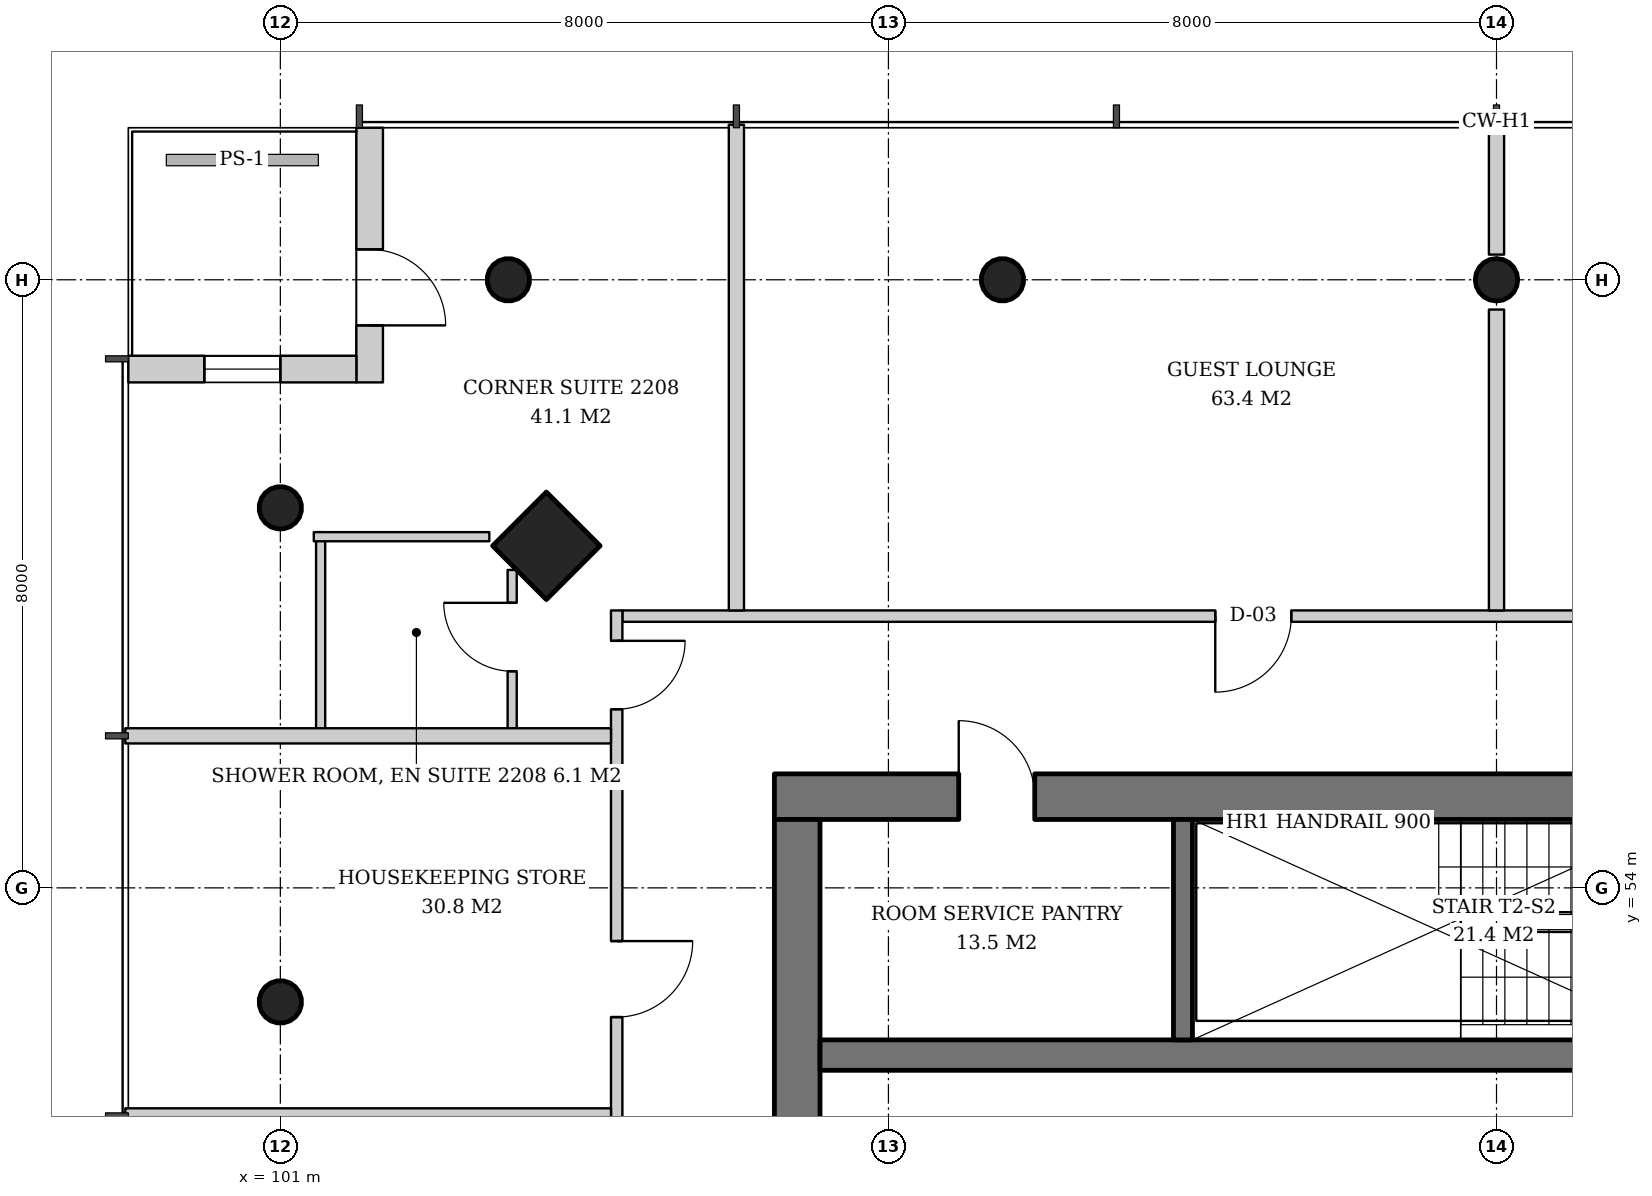
"""IFC4 building model, lengths in metres.
Left out: names, types, materials, properties, quantities, classifications, styles, units other than length and angle.
Written with IfcOpenShell. Run it as: python <this file> out.ifc"""

import sys

from ifc_helpers import new_model, si_unit, direction, frame, frame_2d, origin, origin_2d, place, context, subcontext, project, spatial, rectangle, hollow_circle, extrude, element, fill, save


model = new_model("IFC4")
c1 = context("Model", 3, precision=1e-05, world=origin(), true_north=direction((0.0, 1.0)))
c2 = subcontext(c1, "Body", "Model", "MODEL_VIEW")
j1 = project(units=[si_unit("LENGTHUNIT", "METRE"), si_unit("PLANEANGLEUNIT", "RADIAN")], contexts=[c1])
p1 = place(None, origin())
s1 = spatial("IfcSite", under=j1, at=p1, CompositionType="ELEMENT")
p2 = place(p1, origin())
s2 = spatial("IfcBuilding", under=s1, at=p2, CompositionType="ELEMENT")
p3 = place(p2, frame((0.0, 0.0, 89.4)))
s3 = spatial("IfcBuildingStorey", under=s2, at=p3, CompositionType="ELEMENT", Elevation=89.4)
p4 = place(p3, frame((104.448, 58.552, 0.0), z_axis=(0.043029647111, -0.043029647111, 0.998146732169), x_axis=(0.707106781187, 0.707106781187, 0.0)))
e1 = element("IfcColumn", 1, at=p4, inside=s3, PredefinedType="COLUMN", context=c2, shape_type="SweptSolid", body=[
    extrude(rectangle(XDim=1.0, YDim=1.0, at=origin_2d()), origin(), (0.0, 0.0, 1.0), 3.807),
])
p5 = place(p3, frame((103.948, 62.052, 0.0), z_axis=(0.043029647111, -0.043029647111, 0.998146732169), x_axis=(0.707106781187, 0.707106781187, 0.0)))
e2 = element("IfcColumn", 2, at=p5, inside=s3, PredefinedType="COLUMN", context=c2, shape_type="SweptSolid", body=[
    extrude(hollow_circle(Radius=0.28, WallThickness=0.02, at=origin_2d()), origin(), (0.0, 0.0, 1.0), 3.807),
])
p6 = place(p3, frame((117.0, 62.052, 0.0), z_axis=(0.0, -0.043069538298, 0.999072076915), x_axis=(1.0, 0.0, 0.0)))
e3 = element("IfcColumn", 3, at=p6, inside=s3, PredefinedType="COLUMN", context=c2, shape_type="SweptSolid", body=[
    extrude(hollow_circle(Radius=0.28, WallThickness=0.02, at=origin_2d()), origin(), (0.0, 0.0, 1.0), 3.803),
])
p7 = place(p3, frame((110.474, 62.052, 0.0), z_axis=(0.021561848751, -0.043059525333, 0.998839808957), x_axis=(0.894160516368, 0.44774654769, 0.0)))
e4 = element("IfcColumn", 4, at=p7, inside=s3, PredefinedType="COLUMN", context=c2, shape_type="SweptSolid", body=[
    extrude(hollow_circle(Radius=0.28, WallThickness=0.02, at=origin_2d()), origin(), (0.0, 0.0, 1.0), 3.804),
])
p8 = place(p3, frame((100.948, 59.052, 0.0), z_axis=(0.043029647111, -0.043029647111, 0.998146732169), x_axis=(0.707106781187, 0.707106781187, 0.0)))
e5 = element("IfcColumn", 5, at=p8, inside=s3, PredefinedType="COLUMN", context=c2, shape_type="SweptSolid", body=[
    extrude(hollow_circle(Radius=0.28, WallThickness=0.02, at=origin_2d()), origin(), (0.0, 0.0, 1.0), 3.807),
])
p9 = place(p3, frame((100.948, 52.526, 0.0), z_axis=(0.043059525333, -0.021561848751, 0.998839808957), x_axis=(0.44774654769, 0.894160516368, 0.0)))
e6 = element("IfcColumn", 6, at=p9, inside=s3, PredefinedType="COLUMN", context=c2, shape_type="SweptSolid", body=[
    extrude(hollow_circle(Radius=0.28, WallThickness=0.02, at=origin_2d()), origin(), (0.0, 0.0, 1.0), 3.804),
])
p10 = place(p3, frame((107.5, 55.2, 0.0), z_axis=(0.0, 0.0, 1.0), x_axis=(1.0, 0.0, 0.0)))
e7 = element("IfcWall", 7, at=p10, inside=s3, PredefinedType="SHEAR", context=c2, shape_type="SweptSolid", body=[
    extrude(rectangle(XDim=19.0, YDim=0.6, at=frame_2d((9.5, 0.0))), origin(), (0.0, 0.0, 1.0), 3.8),
])
p11 = place(p10, frame((14.14, 0.0, 0.0)))
e8 = element("IfcOpeningElement", 8, at=p11, cuts=e7, PredefinedType="OPENING", context=c2, shape_type="SweptSolid", body=[
    extrude(rectangle(XDim=1.0, YDim=2.1, at=frame_2d((0.5, 1.05))), frame((0.0, 0.31, 0.0), z_axis=(0.0, -1.0, 0.0), x_axis=(1.0, 0.0, 0.0)), (0.0, 0.0, 1.0), 0.62),
])
p12 = place(p10, frame((2.425, 0.0, 0.0)))
e9 = element("IfcOpeningElement", 9, at=p12, cuts=e7, PredefinedType="OPENING", context=c2, shape_type="SweptSolid", body=[
    extrude(rectangle(XDim=1.0, YDim=2.1, at=frame_2d((0.5, 1.05))), frame((0.0, 0.31, 0.0), z_axis=(0.0, -1.0, 0.0), x_axis=(1.0, 0.0, 0.0)), (0.0, 0.0, 1.0), 0.62),
])
p13 = place(p3, frame((107.8, 37.1, 0.0), z_axis=(0.0, 0.0, 1.0), x_axis=(0.0, 1.0, 0.0)))
e10 = element("IfcWall", 10, at=p13, inside=s3, PredefinedType="SHEAR", context=c2, shape_type="SweptSolid", body=[
    extrude(rectangle(XDim=17.8, YDim=0.6, at=frame_2d((8.9, 0.0))), origin(), (0.0, 0.0, 1.0), 3.8),
])
p14 = place(p13, frame((8.0, 0.0, 0.0)))
e11 = element("IfcOpeningElement", 11, at=p14, cuts=e10, PredefinedType="OPENING", context=c2, shape_type="SweptSolid", body=[
    extrude(rectangle(XDim=1.8, YDim=2.4, at=frame_2d((0.9, 1.2))), frame((0.0, 0.31, 0.0), z_axis=(0.0, -1.0, 0.0), x_axis=(1.0, 0.0, 0.0)), (0.0, 0.0, 1.0), 0.62),
])
p15 = place(p3, frame((108.1, 51.8, 0.0), z_axis=(0.0, 0.0, 1.0), x_axis=(1.0, 0.0, 0.0)))
e12 = element("IfcWall", 12, at=p15, inside=s3, PredefinedType="SHEAR", context=c2, shape_type="SweptSolid", body=[
    extrude(rectangle(XDim=17.8, YDim=0.4, at=frame_2d((8.9, 0.0))), origin(), (0.0, 0.0, 1.0), 3.8),
])
p16 = place(p3, frame((102.175, 64.0, 0.0), z_axis=(0.0, 0.0, 1.0), x_axis=(0.0, -1.0, 0.0)))
e13 = element("IfcWall", 13, at=p16, inside=s3, PredefinedType="SOLIDWALL", context=c2, shape_type="SweptSolid", body=[
    extrude(rectangle(XDim=3.35, YDim=0.35, at=frame_2d((1.675, 0.0))), origin(), (0.0, 0.0, 1.0), 3.6),
])
p17 = place(p16, frame((1.6, 0.0, 0.0)))
e14 = element("IfcOpeningElement", 14, at=p17, cuts=e13, PredefinedType="OPENING", context=c2, shape_type="SweptSolid", body=[
    extrude(rectangle(XDim=1.0, YDim=2.4, at=frame_2d((0.5, 1.2))), frame((0.0, 0.185, 0.0), z_axis=(0.0, -1.0, 0.0), x_axis=(1.0, 0.0, 0.0)), (0.0, 0.0, 1.0), 0.37),
])
p18 = place(p3, frame((102.0, 60.825, 0.0), z_axis=(0.0, 0.0, 1.0), x_axis=(-1.0, 0.0, 0.0)))
e15 = element("IfcWall", 15, at=p18, inside=s3, PredefinedType="SOLIDWALL", context=c2, shape_type="SweptSolid", body=[
    extrude(rectangle(XDim=3.0, YDim=0.35, at=frame_2d((1.5, 0.0))), origin(), (0.0, 0.0, 1.0), 3.6),
])
p19 = place(p18, frame((1.0, 0.0, 0.9)))
e16 = element("IfcOpeningElement", 16, at=p19, cuts=e15, PredefinedType="OPENING", context=c2, shape_type="SweptSolid", body=[
    extrude(rectangle(XDim=1.0, YDim=2.4, at=frame_2d((0.5, 1.2))), frame((0.0, 0.185, 0.0), z_axis=(0.0, -1.0, 0.0), x_axis=(1.0, 0.0, 0.0)), (0.0, 0.0, 1.0), 0.37),
])
p20 = place(p3, frame((112.875, 52.0, 0.0), z_axis=(0.0, 0.0, 1.0), x_axis=(0.0, 1.0, 0.0)))
e17 = element("IfcWall", 17, at=p20, inside=s3, PredefinedType="SHEAR", context=c2, shape_type="SweptSolid", body=[
    extrude(rectangle(XDim=2.9, YDim=0.25, at=frame_2d((1.45, 0.0))), origin(), (0.0, 0.0, 1.0), 3.8),
])
p21 = place(p3, frame((128.65, 57.575, 0.0), z_axis=(0.0, 0.0, 1.0), x_axis=(-1.0, 0.0, 0.0)))
e18 = element("IfcWall", 18, at=p21, inside=s3, PredefinedType="PARTITIONING", context=c2, shape_type="SweptSolid", body=[
    extrude(rectangle(XDim=23.15, YDim=0.15, at=frame_2d((11.575, 0.0))), origin(), (0.0, 0.0, 1.0), 2.9),
])
p22 = place(p21, frame((0.4, 0.0, 0.0)))
e19 = element("IfcOpeningElement", 19, at=p22, cuts=e18, PredefinedType="OPENING", context=c2, shape_type="SweptSolid", body=[
    extrude(rectangle(XDim=0.9, YDim=2.1, at=frame_2d((0.45, 1.05))), frame((0.0, 0.085, 0.0), z_axis=(0.0, -1.0, 0.0), x_axis=(1.0, 0.0, 0.0)), (0.0, 0.0, 1.0), 0.17),
])
p23 = place(p21, frame((3.0, 0.0, 0.0)))
e20 = element("IfcOpeningElement", 20, at=p23, cuts=e18, PredefinedType="OPENING", context=c2, shape_type="SweptSolid", body=[
    extrude(rectangle(XDim=0.9, YDim=2.1, at=frame_2d((0.45, 1.05))), frame((0.0, 0.085, 0.0), z_axis=(0.0, -1.0, 0.0), x_axis=(1.0, 0.0, 0.0)), (0.0, 0.0, 1.0), 0.17),
])
p24 = place(p21, frame((9.4, 0.0, 0.0)))
e21 = element("IfcOpeningElement", 21, at=p24, cuts=e18, PredefinedType="OPENING", context=c2, shape_type="SweptSolid", body=[
    extrude(rectangle(XDim=0.9, YDim=2.1, at=frame_2d((0.45, 1.05))), frame((0.0, 0.085, 0.0), z_axis=(0.0, -1.0, 0.0), x_axis=(1.0, 0.0, 0.0)), (0.0, 0.0, 1.0), 0.17),
])
p25 = place(p21, frame((14.35, 0.0, 0.0)))
e22 = element("IfcOpeningElement", 22, at=p25, cuts=e18, PredefinedType="OPENING", context=c2, shape_type="SweptSolid", body=[
    extrude(rectangle(XDim=1.0, YDim=2.1, at=frame_2d((0.5, 1.05))), frame((0.0, 0.085, 0.0), z_axis=(0.0, -1.0, 0.0), x_axis=(1.0, 0.0, 0.0)), (0.0, 0.0, 1.0), 0.17),
])
p26 = place(p3, frame((117.0, 57.65, 0.0), z_axis=(0.0, 0.0, 1.0), x_axis=(0.0, 1.0, 0.0)))
e23 = element("IfcWall", 23, at=p26, inside=s3, PredefinedType="PARTITIONING", context=c2, shape_type="SweptSolid", body=[
    extrude(rectangle(XDim=3.958, YDim=0.2, at=frame_2d((1.979, 0.0))), origin(), (0.0, 0.0, 1.0), 3.6),
])
p27 = place(p3, frame((117.0, 62.331, 0.0), z_axis=(0.0, 0.0, 1.0), x_axis=(0.0, 1.0, 0.0)))
e24 = element("IfcWall", 24, at=p27, inside=s3, PredefinedType="PARTITIONING", context=c2, shape_type="SweptSolid", body=[
    extrude(rectangle(XDim=1.709, YDim=0.2, at=frame_2d((0.854, 0.0))), origin(), (0.0, 0.0, 1.0), 3.6),
])
p28 = place(p3, frame((107.0, 57.65, 0.0), z_axis=(0.0, 0.0, 1.0), x_axis=(0.0, 1.0, 0.0)))
e25 = element("IfcWall", 25, at=p28, inside=s3, PredefinedType="PARTITIONING", context=c2, shape_type="SweptSolid", body=[
    extrude(rectangle(XDim=6.39, YDim=0.2, at=frame_2d((3.195, 0.0))), origin(), (0.0, 0.0, 1.0), 3.2),
])
p29 = place(p3, frame((104.05, 56.1, 0.0), z_axis=(0.0, 0.0, 1.0), x_axis=(0.0, 1.0, 0.0)))
e26 = element("IfcWall", 26, at=p29, inside=s3, PredefinedType="PARTITIONING", context=c2, shape_type="SweptSolid", body=[
    extrude(rectangle(XDim=2.083, YDim=0.12, at=frame_2d((1.042, 0.0))), origin(), (0.0, 0.0, 1.0), 3.6),
])
p30 = place(p29, frame((0.75, 0.0, 0.0)))
e27 = element("IfcOpeningElement", 27, at=p30, cuts=e26, PredefinedType="OPENING", context=c2, shape_type="SweptSolid", body=[
    extrude(rectangle(XDim=0.9, YDim=2.1, at=frame_2d((0.45, 1.05))), frame((0.0, 0.07, 0.0), z_axis=(0.0, -1.0, 0.0), x_axis=(1.0, 0.0, 0.0)), (0.0, 0.0, 1.0), 0.14),
])
p31 = place(p3, frame((101.53, 56.1, 0.0), z_axis=(0.0, 0.0, 1.0), x_axis=(0.0, 1.0, 0.0)))
e28 = element("IfcWall", 28, at=p31, inside=s3, PredefinedType="PARTITIONING", context=c2, shape_type="SweptSolid", body=[
    extrude(rectangle(XDim=2.58, YDim=0.12, at=frame_2d((1.29, 0.0))), origin(), (0.0, 0.0, 1.0), 3.2),
])
p32 = place(p3, frame((103.75, 58.62, 0.0), z_axis=(0.0, 0.0, 1.0), x_axis=(-1.0, 0.0, 0.0)))
e29 = element("IfcWall", 29, at=p32, inside=s3, PredefinedType="PARTITIONING", context=c2, shape_type="SweptSolid", body=[
    extrude(rectangle(XDim=2.31, YDim=0.12, at=frame_2d((1.155, 0.0))), origin(), (0.0, 0.0, 1.0), 3.2),
])
p33 = place(p3, frame((105.425, 57.65, 0.0), z_axis=(0.0, 0.0, 1.0), x_axis=(0.0, -1.0, 0.0)))
e30 = element("IfcWall", 30, at=p33, inside=s3, PredefinedType="PARTITIONING", context=c2, shape_type="SweptSolid", body=[
    extrude(rectangle(XDim=23.15, YDim=0.15, at=frame_2d((11.575, 0.0))), origin(), (0.0, 0.0, 1.0), 2.9),
])
p34 = place(p33, frame((0.4, 0.0, 0.0)))
e31 = element("IfcOpeningElement", 31, at=p34, cuts=e30, PredefinedType="OPENING", context=c2, shape_type="SweptSolid", body=[
    extrude(rectangle(XDim=0.9, YDim=2.1, at=frame_2d((0.45, 1.05))), frame((0.0, 0.085, 0.0), z_axis=(0.0, -1.0, 0.0), x_axis=(1.0, 0.0, 0.0)), (0.0, 0.0, 1.0), 0.17),
])
p35 = place(p33, frame((4.35, 0.0, 0.0)))
e32 = element("IfcOpeningElement", 32, at=p35, cuts=e30, PredefinedType="OPENING", context=c2, shape_type="SweptSolid", body=[
    extrude(rectangle(XDim=1.0, YDim=2.1, at=frame_2d((0.5, 1.05))), frame((0.0, 0.085, 0.0), z_axis=(0.0, -1.0, 0.0), x_axis=(1.0, 0.0, 0.0)), (0.0, 0.0, 1.0), 0.17),
])
p36 = place(p33, frame((8.0, 0.0, 0.0)))
e33 = element("IfcOpeningElement", 33, at=p36, cuts=e30, PredefinedType="OPENING", context=c2, shape_type="SweptSolid", body=[
    extrude(rectangle(XDim=0.9, YDim=2.1, at=frame_2d((0.45, 1.05))), frame((0.0, 0.085, 0.0), z_axis=(0.0, -1.0, 0.0), x_axis=(1.0, 0.0, 0.0)), (0.0, 0.0, 1.0), 0.17),
])
p37 = place(p33, frame((14.4, 0.0, 0.0)))
e34 = element("IfcOpeningElement", 34, at=p37, cuts=e30, PredefinedType="OPENING", context=c2, shape_type="SweptSolid", body=[
    extrude(rectangle(XDim=0.9, YDim=2.1, at=frame_2d((0.45, 1.05))), frame((0.0, 0.085, 0.0), z_axis=(0.0, -1.0, 0.0), x_axis=(1.0, 0.0, 0.0)), (0.0, 0.0, 1.0), 0.17),
])
p38 = place(p33, frame((18.0, 0.0, 0.0)))
e35 = element("IfcOpeningElement", 35, at=p38, cuts=e30, PredefinedType="OPENING", context=c2, shape_type="SweptSolid", body=[
    extrude(rectangle(XDim=0.9, YDim=2.1, at=frame_2d((0.45, 1.05))), frame((0.0, 0.085, 0.0), z_axis=(0.0, -1.0, 0.0), x_axis=(1.0, 0.0, 0.0)), (0.0, 0.0, 1.0), 0.17),
])
p39 = place(p3, frame((105.35, 56.0, 0.0), z_axis=(0.0, 0.0, 1.0), x_axis=(-1.0, 0.0, 0.0)))
e36 = element("IfcWall", 36, at=p39, inside=s3, PredefinedType="PARTITIONING", context=c2, shape_type="SweptSolid", body=[
    extrude(rectangle(XDim=6.39, YDim=0.2, at=frame_2d((3.195, 0.0))), origin(), (0.0, 0.0, 1.0), 3.2),
])
p40 = place(p3, frame((105.35, 51.0, 0.0), z_axis=(0.0, 0.0, 1.0), x_axis=(-1.0, 0.0, 0.0)))
e37 = element("IfcWall", 37, at=p40, inside=s3, PredefinedType="PARTITIONING", context=c2, shape_type="SweptSolid", body=[
    extrude(rectangle(XDim=6.39, YDim=0.2, at=frame_2d((3.195, 0.0))), origin(), (0.0, 0.0, 1.0), 3.0),
])
p41 = place(p17, origin())
e38 = element("IfcDoor", 38, at=p41, inside=s3, OperationType="SINGLE_SWING_RIGHT", PredefinedType="DOOR", context=c2, shape_type="SweptSolid", body=[
    extrude(rectangle(XDim=1.0, YDim=2.4, at=frame_2d((0.5, 1.2))), frame((0.0, 0.025, 0.0), z_axis=(0.0, -1.0, 0.0), x_axis=(1.0, 0.0, 0.0)), (0.0, 0.0, 1.0), 0.05),
])
fill(e14, e38)
p42 = place(p19, origin())
e39 = element("IfcWindow", 39, at=p42, inside=s3, PartitioningType="SINGLE_PANEL", PredefinedType="WINDOW", context=c2, shape_type="SweptSolid", body=[
    extrude(rectangle(XDim=1.0, YDim=2.4, at=frame_2d((0.5, 1.2))), frame((0.0, 0.03, 0.0), z_axis=(0.0, -1.0, 0.0), x_axis=(1.0, 0.0, 0.0)), (0.0, 0.0, 1.0), 0.06),
])
fill(e16, e39)
p43 = place(p12, origin())
e40 = element("IfcDoor", 40, at=p43, inside=s3, OperationType="SINGLE_SWING_LEFT", PredefinedType="DOOR", context=c2, shape_type="SweptSolid", body=[
    extrude(rectangle(XDim=1.0, YDim=2.1, at=frame_2d((0.5, 1.05))), frame((0.0, -0.24, 0.0), z_axis=(0.0, -1.0, 0.0), x_axis=(1.0, 0.0, 0.0)), (0.0, 0.0, 1.0), 0.05),
])
fill(e9, e40)
p44 = place(p25, origin())
e41 = element("IfcDoor", 41, at=p44, inside=s3, OperationType="SINGLE_SWING_RIGHT", PredefinedType="DOOR", context=c2, shape_type="SweptSolid", body=[
    extrude(rectangle(XDim=1.0, YDim=2.1, at=frame_2d((0.5, 1.05))), frame((0.0, 0.025, 0.0), z_axis=(0.0, -1.0, 0.0), x_axis=(1.0, 0.0, 0.0)), (0.0, 0.0, 1.0), 0.05),
])
fill(e22, e41)
p45 = place(p30, origin())
e42 = element("IfcDoor", 42, at=p45, inside=s3, OperationType="SINGLE_SWING_RIGHT", PredefinedType="DOOR", context=c2, shape_type="SweptSolid", body=[
    extrude(rectangle(XDim=0.9, YDim=2.1, at=frame_2d((0.45, 1.05))), frame((0.0, 0.025, 0.0), z_axis=(0.0, -1.0, 0.0), x_axis=(1.0, 0.0, 0.0)), (0.0, 0.0, 1.0), 0.05),
])
fill(e27, e42)
p46 = place(p34, origin())
e43 = element("IfcDoor", 43, at=p46, inside=s3, OperationType="SINGLE_SWING_LEFT", PredefinedType="DOOR", context=c2, shape_type="SweptSolid", body=[
    extrude(rectangle(XDim=0.9, YDim=2.1, at=frame_2d((0.45, 1.05))), frame((0.0, 0.025, 0.0), z_axis=(0.0, -1.0, 0.0), x_axis=(1.0, 0.0, 0.0)), (0.0, 0.0, 1.0), 0.05),
])
fill(e31, e43)
p47 = place(p35, origin())
e44 = element("IfcDoor", 44, at=p47, inside=s3, OperationType="SINGLE_SWING_LEFT", PredefinedType="DOOR", context=c2, shape_type="SweptSolid", body=[
    extrude(rectangle(XDim=1.0, YDim=2.1, at=frame_2d((0.5, 1.05))), frame((0.0, 0.025, 0.0), z_axis=(0.0, -1.0, 0.0), x_axis=(1.0, 0.0, 0.0)), (0.0, 0.0, 1.0), 0.05),
])
fill(e32, e44)
save(model, sys.argv[1])
